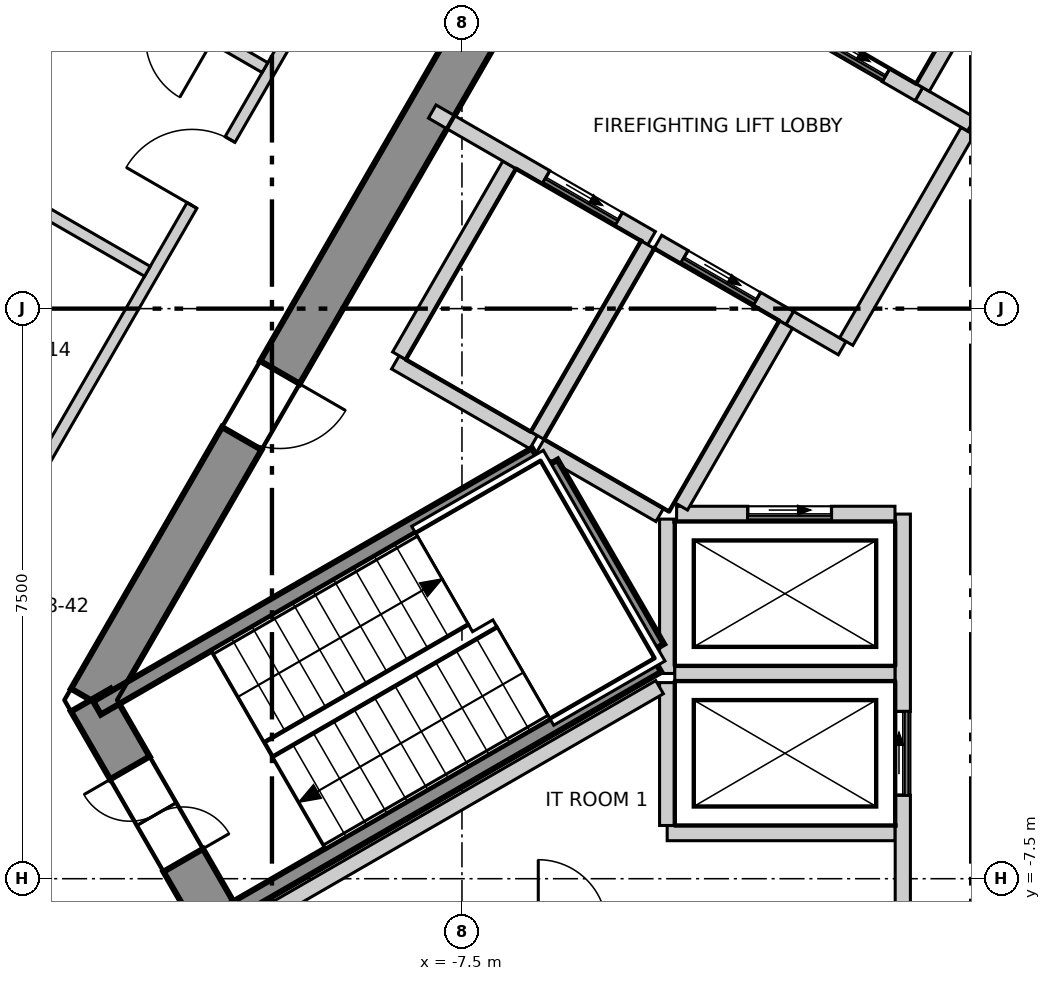
"""IFC4 building model, lengths in metres.
Left out: names, types, materials, properties, quantities, classifications, styles, units other than length and angle.
Written with IfcOpenShell. Run it as: python <this file> out.ifc"""

import sys

from ifc_helpers import new_model, si_unit, direction, frame, frame_2d, origin, place, context, subcontext, project, spatial, polyline, rectangle, outline, extrude, element, fill, save


model = new_model("IFC4")
c1 = context("Model", 3, precision=1e-05, world=origin(), true_north=direction((0.0, 1.0)))
c2 = subcontext(c1, "Body", "Model", "MODEL_VIEW")
j1 = project(units=[si_unit("LENGTHUNIT", "METRE"), si_unit("PLANEANGLEUNIT", "RADIAN")], contexts=[c1])
p1 = place(None, origin())
s1 = spatial("IfcSite", under=j1, at=p1, CompositionType="ELEMENT")
p2 = place(p1, origin())
s2 = spatial("IfcBuilding", under=s1, at=p2, CompositionType="ELEMENT")
p3 = place(p2, frame((0.0, 0.0, 289.9)))
s3 = spatial("IfcBuildingStorey", under=s2, at=p3, CompositionType="ELEMENT", Elevation=289.9)
p4 = place(p3, frame((-1.732, 13.3, -0.3), z_axis=(0.0, 0.0, 1.0), x_axis=(-0.500000539815, -0.866025092122, 0.0)))
e1 = element("IfcWall", 1, at=p4, inside=s3, PredefinedType="SHEAR", context=c2, shape_type="SweptSolid", body=[
    extrude(outline(polyline([(-0.173, -0.3), (1.795, -0.3), (3.763, -0.3), (5.732, -0.3), (7.7, -0.3), (9.668, -0.301), (11.637, -0.301), (13.605, -0.301), (15.573, -0.301), (17.542, -0.301), (19.51, -0.301), (21.478, -0.301), (21.131, 0.3), (19.226, 0.3), (17.321, 0.3), (15.415, 0.3), (13.51, 0.3), (11.605, 0.3), (9.699, 0.3), (7.794, 0.3), (5.889, 0.3), (3.984, 0.3), (2.078, 0.3), (0.173, 0.3), (-0.173, -0.3)])), origin(), (0.0, 0.0, 1.0), 3.6),
])
p5 = place(p4, frame((10.102, 0.0, 0.3)))
e2 = element("IfcOpeningElement", 2, at=p5, cuts=e1, PredefinedType="OPENING", context=c2, shape_type="SweptSolid", body=[
    extrude(rectangle(XDim=1.1, YDim=2.1, at=frame_2d((0.55, 1.05))), frame((0.0, 0.31, 0.0), z_axis=(0.0, -1.0, 0.0), x_axis=(1.0, 0.0, 0.0)), (0.0, 0.0, 1.0), 0.621),
])
p6 = place(p4, frame((16.328, 0.0, 0.3)))
e3 = element("IfcOpeningElement", 3, at=p6, cuts=e1, PredefinedType="OPENING", context=c2, shape_type="SweptSolid", body=[
    extrude(rectangle(XDim=1.0, YDim=2.1, at=frame_2d((0.5, 1.05))), frame((0.0, 0.31, 0.0), z_axis=(0.0, -1.0, 0.0), x_axis=(1.0, 0.0, 0.0)), (0.0, 0.0, 1.0), 0.621),
])
p7 = place(p4, frame((4.777, 0.0, 0.3)))
e4 = element("IfcOpeningElement", 4, at=p7, cuts=e1, PredefinedType="OPENING", context=c2, shape_type="SweptSolid", body=[
    extrude(rectangle(XDim=0.9, YDim=2.1, at=frame_2d((0.45, 1.05))), frame((0.0, 0.31, 0.0), z_axis=(0.0, -1.0, 0.0), x_axis=(1.0, 0.0, 0.0)), (0.0, 0.0, 1.0), 0.621),
])
p8 = place(p3, frame((-12.384, -5.15, -0.3), z_axis=(0.0, 0.0, 1.0), x_axis=(0.49997462182, -0.866040055388, 0.0)))
e5 = element("IfcWall", 5, at=p8, inside=s3, PredefinedType="SHEAR", context=c2, shape_type="SweptSolid", body=[
    extrude(outline(polyline([(-0.173, -0.301), (1.732, -0.301), (3.637, -0.3), (3.291, 0.3), (1.732, 0.3), (0.173, 0.3), (-0.173, -0.301)])), origin(), (0.0, 0.0, 1.0), 3.6),
])
p9 = place(p8, frame((1.032, 0.0, 0.3)))
e6 = element("IfcOpeningElement", 6, at=p9, cuts=e5, PredefinedType="OPENING", context=c2, shape_type="SweptSolid", body=[
    extrude(rectangle(XDim=1.4, YDim=2.1, at=frame_2d((0.7, 1.05))), frame((0.0, 0.31, 0.0), z_axis=(0.0, -1.0, 0.0), x_axis=(1.0, 0.0, 0.0)), (0.0, 0.0, 1.0), 0.621),
])
p10 = place(p3, frame((-2.494, 27.86, 0.0), z_axis=(0.0, 0.0, 1.0), x_axis=(-0.500008134474, -0.866020707292, 0.0)))
e7 = element("IfcWall", 7, at=p10, inside=s3, PredefinedType="ELEMENTEDWALL", context=c2, shape_type="SweptSolid", body=[
    extrude(rectangle(XDim=45.741, YDim=0.2, at=frame_2d((22.871, 0.0))), origin(), (0.0, 0.0, 1.0), 3.3),
])
p11 = place(p10, frame((2.15, 0.0, 0.9)))
e8 = element("IfcOpeningElement", 8, at=p11, cuts=e7, PredefinedType="OPENING", context=c2, shape_type="SweptSolid", body=[
    extrude(rectangle(XDim=3.7, YDim=2.2, at=frame_2d((1.85, 1.1))), frame((0.0, 0.11, 0.0), z_axis=(0.0, -1.0, 0.0), x_axis=(1.0, 0.0, 0.0)), (0.0, 0.0, 1.0), 0.22),
])
p12 = place(p10, frame((7.544, 0.0, 0.9)))
e9 = element("IfcOpeningElement", 9, at=p12, cuts=e7, PredefinedType="OPENING", context=c2, shape_type="SweptSolid", body=[
    extrude(rectangle(XDim=3.7, YDim=2.2, at=frame_2d((1.85, 1.1))), frame((0.0, 0.11, 0.0), z_axis=(0.0, -1.0, 0.0), x_axis=(1.0, 0.0, 0.0)), (0.0, 0.0, 1.0), 0.22),
])
p13 = place(p10, frame((12.939, 0.0, 0.9)))
e10 = element("IfcOpeningElement", 10, at=p13, cuts=e7, PredefinedType="OPENING", context=c2, shape_type="SweptSolid", body=[
    extrude(rectangle(XDim=3.7, YDim=2.2, at=frame_2d((1.85, 1.1))), frame((0.0, 0.11, 0.0), z_axis=(0.0, -1.0, 0.0), x_axis=(1.0, 0.0, 0.0)), (0.0, 0.0, 1.0), 0.22),
])
p14 = place(p10, frame((18.333, 0.0, 0.9)))
e11 = element("IfcOpeningElement", 11, at=p14, cuts=e7, PredefinedType="OPENING", context=c2, shape_type="SweptSolid", body=[
    extrude(rectangle(XDim=3.7, YDim=2.2, at=frame_2d((1.85, 1.1))), frame((0.0, 0.11, 0.0), z_axis=(0.0, -1.0, 0.0), x_axis=(1.0, 0.0, 0.0)), (0.0, 0.0, 1.0), 0.22),
])
p15 = place(p10, frame((23.728, 0.0, 0.9)))
e12 = element("IfcOpeningElement", 12, at=p15, cuts=e7, PredefinedType="OPENING", context=c2, shape_type="SweptSolid", body=[
    extrude(rectangle(XDim=3.7, YDim=2.2, at=frame_2d((1.85, 1.1))), frame((0.0, 0.11, 0.0), z_axis=(0.0, -1.0, 0.0), x_axis=(1.0, 0.0, 0.0)), (0.0, 0.0, 1.0), 0.22),
])
p16 = place(p10, frame((29.122, 0.0, 0.9)))
e13 = element("IfcOpeningElement", 13, at=p16, cuts=e7, PredefinedType="OPENING", context=c2, shape_type="SweptSolid", body=[
    extrude(rectangle(XDim=3.7, YDim=2.2, at=frame_2d((1.85, 1.1))), frame((0.0, 0.11, 0.0), z_axis=(0.0, -1.0, 0.0), x_axis=(1.0, 0.0, 0.0)), (0.0, 0.0, 1.0), 0.22),
])
p17 = place(p10, frame((34.517, 0.0, 0.9)))
e14 = element("IfcOpeningElement", 14, at=p17, cuts=e7, PredefinedType="OPENING", context=c2, shape_type="SweptSolid", body=[
    extrude(rectangle(XDim=3.7, YDim=2.2, at=frame_2d((1.85, 1.1))), frame((0.0, 0.11, 0.0), z_axis=(0.0, -1.0, 0.0), x_axis=(1.0, 0.0, 0.0)), (0.0, 0.0, 1.0), 0.22),
])
p18 = place(p10, frame((39.911, 0.0, 0.9)))
e15 = element("IfcOpeningElement", 15, at=p18, cuts=e7, PredefinedType="OPENING", context=c2, shape_type="SweptSolid", body=[
    extrude(rectangle(XDim=3.7, YDim=2.2, at=frame_2d((1.85, 1.1))), frame((0.0, 0.11, 0.0), z_axis=(0.0, -1.0, 0.0), x_axis=(1.0, 0.0, 0.0)), (0.0, 0.0, 1.0), 0.22),
])
p19 = place(p3, frame((-17.679, -10.12, 0.0), z_axis=(0.0, 0.0, 1.0), x_axis=(0.500008955215, 0.866020233427, 0.0)))
e16 = element("IfcWall", 16, at=p19, inside=s3, PredefinedType="PARTITIONING", context=c2, shape_type="SweptSolid", body=[
    extrude(rectangle(XDim=35.357, YDim=0.15, at=frame_2d((17.679, 0.0))), origin(), (0.0, 0.0, 1.0), 3.3),
])
p20 = place(p19, frame((31.407, 0.0, 0.0)))
e17 = element("IfcOpeningElement", 17, at=p20, cuts=e16, PredefinedType="OPENING", context=c2, shape_type="SweptSolid", body=[
    extrude(rectangle(XDim=1.0, YDim=2.1, at=frame_2d((0.5, 1.05))), frame((0.0, 0.085, 0.0), z_axis=(0.0, -1.0, 0.0), x_axis=(1.0, 0.0, 0.0)), (0.0, 0.0, 1.0), 0.17),
])
p21 = place(p19, frame((25.642, 0.0, 0.0)))
e18 = element("IfcOpeningElement", 18, at=p21, cuts=e16, PredefinedType="OPENING", context=c2, shape_type="SweptSolid", body=[
    extrude(rectangle(XDim=1.0, YDim=2.1, at=frame_2d((0.5, 1.05))), frame((0.0, 0.085, 0.0), z_axis=(0.0, -1.0, 0.0), x_axis=(1.0, 0.0, 0.0)), (0.0, 0.0, 1.0), 0.17),
])
p22 = place(p19, frame((18.348, 0.0, 0.0)))
e19 = element("IfcOpeningElement", 19, at=p22, cuts=e16, PredefinedType="OPENING", context=c2, shape_type="SweptSolid", body=[
    extrude(rectangle(XDim=1.0, YDim=2.1, at=frame_2d((0.5, 1.05))), frame((0.0, 0.085, 0.0), z_axis=(0.0, -1.0, 0.0), x_axis=(1.0, 0.0, 0.0)), (0.0, 0.0, 1.0), 0.17),
])
p23 = place(p19, frame((13.254, 0.0, 0.0)))
e20 = element("IfcOpeningElement", 20, at=p23, cuts=e16, PredefinedType="OPENING", context=c2, shape_type="SweptSolid", body=[
    extrude(rectangle(XDim=1.0, YDim=2.1, at=frame_2d((0.5, 1.05))), frame((0.0, 0.085, 0.0), z_axis=(0.0, -1.0, 0.0), x_axis=(1.0, 0.0, 0.0)), (0.0, 0.0, 1.0), 0.17),
])
p24 = place(p19, frame((7.559, 0.0, 0.0)))
e21 = element("IfcOpeningElement", 21, at=p24, cuts=e16, PredefinedType="OPENING", context=c2, shape_type="SweptSolid", body=[
    extrude(rectangle(XDim=1.0, YDim=2.1, at=frame_2d((0.5, 1.05))), frame((0.0, 0.085, 0.0), z_axis=(0.0, -1.0, 0.0), x_axis=(1.0, 0.0, 0.0)), (0.0, 0.0, 1.0), 0.17),
])
p25 = place(p19, frame((2.865, 0.0, 0.0)))
e22 = element("IfcOpeningElement", 22, at=p25, cuts=e16, PredefinedType="OPENING", context=c2, shape_type="SweptSolid", body=[
    extrude(rectangle(XDim=1.0, YDim=2.1, at=frame_2d((0.5, 1.05))), frame((0.0, 0.085, 0.0), z_axis=(0.0, -1.0, 0.0), x_axis=(1.0, 0.0, 0.0)), (0.0, 0.0, 1.0), 0.17),
])
p26 = place(p3, frame((-16.562, 3.333, 0.0), z_axis=(0.0, 0.0, 1.0), x_axis=(0.866048987239, -0.499959150034, 0.0)))
e23 = element("IfcWall", 23, at=p26, inside=s3, PredefinedType="PARTITIONING", context=c2, shape_type="SweptSolid", body=[
    extrude(rectangle(XDim=5.685, YDim=0.15, at=frame_2d((2.842, 0.0))), origin(), (0.0, 0.0, 1.0), 3.3),
])
p27 = place(p3, frame((-12.3, 4.446, 0.0), z_axis=(0.0, 0.0, 1.0), x_axis=(0.865965520905, -0.500103705848, 0.0)))
e24 = element("IfcWall", 24, at=p27, inside=s3, PredefinedType="PARTITIONING", context=c2, shape_type="SweptSolid", body=[
    extrude(rectangle(XDim=2.55, YDim=0.15, at=frame_2d((1.275, 0.0))), origin(), (0.0, 0.0, 1.0), 3.3),
])
p28 = place(p27, frame((0.875, 0.0, 0.0)))
e25 = element("IfcOpeningElement", 25, at=p28, cuts=e24, PredefinedType="OPENING", context=c2, shape_type="SweptSolid", body=[
    extrude(rectangle(XDim=0.9, YDim=2.1, at=frame_2d((0.45, 1.05))), frame((0.0, 0.085, 0.0), z_axis=(0.0, -1.0, 0.0), x_axis=(1.0, 0.0, 0.0)), (0.0, 0.0, 1.0), 0.17),
])
p29 = place(p3, frame((-8.376, -0.707, 0.0), z_axis=(0.0, 0.0, 1.0), x_axis=(0.866067520717, -0.499927044236, 0.0)))
e26 = element("IfcWall", 26, at=p29, inside=s3, PredefinedType="SOLIDWALL", context=c2, shape_type="SweptSolid", body=[
    extrude(rectangle(XDim=2.1, YDim=0.2, at=frame_2d((1.05, 0.0))), origin(), (0.0, 0.0, 1.0), 3.3),
])
p30 = place(p3, frame((-8.326, -0.62, 0.0), z_axis=(0.0, 0.0, 1.0), x_axis=(0.500023687443, 0.866011727401, 0.0)))
e27 = element("IfcWall", 27, at=p30, inside=s3, PredefinedType="SOLIDWALL", context=c2, shape_type="SweptSolid", body=[
    extrude(rectangle(XDim=2.9, YDim=0.2, at=frame_2d((1.45, 0.0))), origin(), (0.0, 0.0, 1.0), 3.3),
])
p31 = place(p3, frame((-4.8, -6.9, 0.0), z_axis=(0.0, 0.0, 1.0), x_axis=(1.0, 0.0, 0.0)))
e28 = element("IfcWall", 28, at=p31, inside=s3, PredefinedType="SOLIDWALL", context=c2, shape_type="SweptSolid", body=[
    extrude(rectangle(XDim=3.0, YDim=0.2, at=frame_2d((1.5, 0.0))), origin(), (0.0, 0.0, 1.0), 3.3),
])
p32 = place(p3, frame((-4.8, -6.8, 0.0), z_axis=(0.0, 0.0, 1.0), x_axis=(0.0, 1.0, 0.0)))
e29 = element("IfcWall", 29, at=p32, inside=s3, PredefinedType="SOLIDWALL", context=c2, shape_type="SweptSolid", body=[
    extrude(rectangle(XDim=1.88, YDim=0.2, at=frame_2d((0.94, 0.0))), origin(), (0.0, 0.0, 1.0), 3.3),
])
p33 = place(p3, frame((-4.8, -4.8, 0.0), z_axis=(0.0, 0.0, 1.0), x_axis=(0.0, 1.0, 0.0)))
e30 = element("IfcWall", 30, at=p33, inside=s3, PredefinedType="SOLIDWALL", context=c2, shape_type="SweptSolid", body=[
    extrude(rectangle(XDim=2.031, YDim=0.2, at=frame_2d((1.016, 0.0))), origin(), (0.0, 0.0, 1.0), 3.3),
])
p34 = place(p3, frame((-4.7, -4.8, 0.0), z_axis=(0.0, 0.0, 1.0), x_axis=(1.0, 0.0, 0.0)))
e31 = element("IfcWall", 31, at=p34, inside=s3, PredefinedType="SOLIDWALL", context=c2, shape_type="SweptSolid", body=[
    extrude(rectangle(XDim=2.9, YDim=0.2, at=frame_2d((1.45, 0.0))), origin(), (0.0, 0.0, 1.0), 3.3),
])
p35 = place(p3, frame((-1.7, -8.13, 0.0), z_axis=(0.0, 0.0, 1.0), x_axis=(0.0, 1.0, 0.0)))
e32 = element("IfcWall", 32, at=p35, inside=s3, PredefinedType="SOLIDWALL", context=c2, shape_type="SweptSolid", body=[
    extrude(rectangle(XDim=5.427, YDim=0.2, at=frame_2d((2.713, 0.0))), origin(), (0.0, 0.0, 1.0), 3.3),
])
p36 = place(p35, frame((1.73, 0.0, 0.0)))
e33 = element("IfcOpeningElement", 33, at=p36, cuts=e32, PredefinedType="OPENING", context=c2, shape_type="SweptSolid", body=[
    extrude(rectangle(XDim=1.1, YDim=2.1, at=frame_2d((0.55, 1.05))), frame((0.0, 0.11, 0.0), z_axis=(0.0, -1.0, 0.0), x_axis=(1.0, 0.0, 0.0)), (0.0, 0.0, 1.0), 0.22),
])
p37 = place(p3, frame((-4.676, -2.7, 0.0), z_axis=(0.0, 0.0, 1.0), x_axis=(1.0, 0.0, 0.0)))
e34 = element("IfcWall", 34, at=p37, inside=s3, PredefinedType="SOLIDWALL", context=c2, shape_type="SweptSolid", body=[
    extrude(rectangle(XDim=2.873, YDim=0.2, at=frame_2d((1.437, 0.0))), origin(), (0.0, 0.0, 1.0), 3.3),
])
p38 = place(p37, frame((0.937, 0.0, 0.0)))
e35 = element("IfcOpeningElement", 35, at=p38, cuts=e34, PredefinedType="OPENING", context=c2, shape_type="SweptSolid", body=[
    extrude(rectangle(XDim=1.1, YDim=2.1, at=frame_2d((0.55, 1.05))), frame((0.0, 0.11, 0.0), z_axis=(0.0, -1.0, 0.0), x_axis=(1.0, 0.0, 0.0)), (0.0, 0.0, 1.0), 0.22),
])
p39 = place(p3, frame((-7.891, 2.593, 0.0), z_axis=(0.0, 0.0, 1.0), x_axis=(0.866070917804, -0.499921159118, 0.0)))
e36 = element("IfcWall", 36, at=p39, inside=s3, PredefinedType="SOLIDWALL", context=c2, shape_type="SweptSolid", body=[
    extrude(rectangle(XDim=3.333, YDim=0.2, at=frame_2d((1.666, 0.0))), origin(), (0.0, 0.0, 1.0), 3.3),
])
p40 = place(p39, frame((1.73, 0.0, 0.0)))
e37 = element("IfcOpeningElement", 37, at=p40, cuts=e36, PredefinedType="OPENING", context=c2, shape_type="SweptSolid", body=[
    extrude(rectangle(XDim=1.1, YDim=2.1, at=frame_2d((0.55, 1.05))), frame((0.0, 0.11, 0.0), z_axis=(0.0, -1.0, 0.0), x_axis=(1.0, 0.0, 0.0)), (0.0, 0.0, 1.0), 0.22),
])
p41 = place(p3, frame((-3.188, -0.122, 0.0), z_axis=(0.0, 0.0, 1.0), x_axis=(0.865705793592, -0.50055317294, 0.0)))
e38 = element("IfcWall", 38, at=p41, inside=s3, PredefinedType="SOLIDWALL", context=c2, shape_type="SweptSolid", body=[
    extrude(rectangle(XDim=0.797, YDim=0.2, at=frame_2d((0.398, 0.0))), origin(), (0.0, 0.0, 1.0), 3.3),
])
p42 = place(p3, frame((-1.488, 2.822, 0.0), z_axis=(0.0, 0.0, 1.0), x_axis=(0.866236612152, -0.499633997809, 0.0)))
e39 = element("IfcWall", 39, at=p42, inside=s3, PredefinedType="SOLIDWALL", context=c2, shape_type="SweptSolid", body=[
    extrude(rectangle(XDim=0.796, YDim=0.2, at=frame_2d((0.398, 0.0))), origin(), (0.0, 0.0, 1.0), 3.3),
])
p43 = place(p3, frame((-2.444, -0.433, 0.0), z_axis=(0.0, 0.0, 1.0), x_axis=(0.500035624827, 0.866004834804, 0.0)))
e40 = element("IfcWall", 40, at=p43, inside=s3, PredefinedType="SOLIDWALL", context=c2, shape_type="SweptSolid", body=[
    extrude(rectangle(XDim=3.194, YDim=0.2, at=frame_2d((1.597, 0.0))), origin(), (0.0, 0.0, 1.0), 3.3),
])
p44 = place(p3, frame((-6.507, -1.67, 0.0), z_axis=(0.0, 0.0, 1.0), x_axis=(0.50012328804, 0.865954211699, 0.0)))
e41 = element("IfcWall", 41, at=p44, inside=s3, PredefinedType="SOLIDWALL", context=c2, shape_type="SweptSolid", body=[
    extrude(rectangle(XDim=2.9, YDim=0.2, at=frame_2d((1.45, 0.0))), origin(), (0.0, 0.0, 1.0), 3.3),
])
p45 = place(p3, frame((-6.47, -1.807, 0.0), z_axis=(0.0, 0.0, 1.0), x_axis=(0.865883195159, -0.500246231712, 0.0)))
e42 = element("IfcWall", 42, at=p45, inside=s3, PredefinedType="SOLIDWALL", context=c2, shape_type="SweptSolid", body=[
    extrude(rectangle(XDim=1.815, YDim=0.2, at=frame_2d((0.908, 0.0))), origin(), (0.0, 0.0, 1.0), 3.3),
])
p46 = place(p3, frame((-4.922, 0.879, 0.0), z_axis=(0.0, 0.0, 1.0), x_axis=(0.866073918653, -0.499915960366, 0.0)))
e43 = element("IfcWall", 43, at=p46, inside=s3, PredefinedType="SOLIDWALL", context=c2, shape_type="SweptSolid", body=[
    extrude(rectangle(XDim=2.002, YDim=0.2, at=frame_2d((1.001, 0.0))), origin(), (0.0, 0.0, 1.0), 3.3),
])
p47 = place(p46, frame((0.402, 0.0, 0.0)))
e44 = element("IfcOpeningElement", 44, at=p47, cuts=e43, PredefinedType="OPENING", context=c2, shape_type="SweptSolid", body=[
    extrude(rectangle(XDim=1.1, YDim=2.1, at=frame_2d((0.55, 1.05))), frame((0.0, 0.11, 0.0), z_axis=(0.0, -1.0, 0.0), x_axis=(1.0, 0.0, 0.0)), (0.0, 0.0, 1.0), 0.22),
])
p48 = place(p3, frame((-4.619, -2.6, 0.0), z_axis=(0.0, 0.0, 1.0), x_axis=(0.50009492287, 0.865970593103, 0.0)))
e45 = element("IfcWall", 45, at=p48, inside=s3, PredefinedType="SOLIDWALL", context=c2, shape_type="SweptSolid", body=[
    extrude(rectangle(XDim=2.761, YDim=0.2, at=frame_2d((1.381, 0.0))), origin(), (0.0, 0.0, 1.0), 3.3),
])
p49 = place(p3, frame((-3.309, 3.873, 0.0), z_axis=(0.0, 0.0, 1.0), x_axis=(0.866098583652, -0.499873227325, 0.0)))
e46 = element("IfcWall", 46, at=p49, inside=s3, PredefinedType="SOLIDWALL", context=c2, shape_type="SweptSolid", body=[
    extrude(rectangle(XDim=2.103, YDim=0.2, at=frame_2d((1.051, 0.0))), origin(), (0.0, 0.0, 1.0), 3.3),
])
p50 = place(p49, frame((0.502, 0.0, 0.0)))
e47 = element("IfcOpeningElement", 47, at=p50, cuts=e46, PredefinedType="OPENING", context=c2, shape_type="SweptSolid", body=[
    extrude(rectangle(XDim=1.1, YDim=2.1, at=frame_2d((0.55, 1.05))), frame((0.0, 0.11, 0.0), z_axis=(0.0, -1.0, 0.0), x_axis=(1.0, 0.0, 0.0)), (0.0, 0.0, 1.0), 0.22),
])
p51 = place(p3, frame((-1.438, 2.909, 0.0), z_axis=(0.0, 0.0, 1.0), x_axis=(0.499829630636, 0.866123744241, 0.0)))
e48 = element("IfcWall", 48, at=p51, inside=s3, PredefinedType="SOLIDWALL", context=c2, shape_type="SweptSolid", body=[
    extrude(rectangle(XDim=2.761, YDim=0.2, at=frame_2d((1.38, 0.0))), origin(), (0.0, 0.0, 1.0), 3.3),
])
p52 = place(p3, frame((-10.357, -8.13, 0.0), z_axis=(0.0, 0.0, 1.0), x_axis=(0.866074613031, 0.499914757397, 0.0)))
e49 = element("IfcWall", 49, at=p52, inside=s3, PredefinedType="SOLIDWALL", context=c2, shape_type="SweptSolid", body=[
    extrude(rectangle(XDim=6.301, YDim=0.2, at=frame_2d((3.15, 0.0))), origin(), (0.0, 0.0, 1.0), 3.3),
])
p53 = place(p3, frame((-12.301, -5.254, 0.0), z_axis=(0.0, 0.0, 1.0), x_axis=(0.866068467981, 0.499925403204, 0.0)))
e50 = element("IfcWall", 50, at=p53, inside=s3, PredefinedType="SOLIDWALL", context=c2, shape_type="SweptSolid", body=[
    extrude(rectangle(XDim=6.665, YDim=0.2, at=frame_2d((3.332, 0.0))), origin(), (0.0, 0.0, 1.0), 3.3),
])
p54 = place(p3, frame((-6.329, -2.038, 0.0), z_axis=(0.0, 0.0, 1.0), x_axis=(0.500200581029, -0.865909567298, 0.0)))
e51 = element("IfcWall", 51, at=p54, inside=s3, PredefinedType="SOLIDWALL", context=c2, shape_type="SweptSolid", body=[
    extrude(rectangle(XDim=2.799, YDim=0.2, at=frame_2d((1.399, 0.0))), origin(), (0.0, 0.0, 1.0), 3.3),
])
p55 = place(p3, frame((-10.701, -8.026, 0.0), z_axis=(0.0, 0.0, 1.0), x_axis=(0.866005022404, 0.500035299925, 0.0)))
e52 = element("IfcWall", 52, at=p55, inside=s3, PredefinedType="SOLIDWALL", context=c2, shape_type="SweptSolid", body=[
    extrude(rectangle(XDim=6.665, YDim=0.2, at=frame_2d((3.333, 0.0))), origin(), (0.0, 0.0, 1.0), 3.3),
])
p56 = place(p38, origin())
e53 = element("IfcDoor", 53, at=p56, inside=s3, OperationType="SLIDING_TO_LEFT", PredefinedType="DOOR", context=c2, shape_type="SweptSolid", body=[
    extrude(rectangle(XDim=1.1, YDim=2.1, at=frame_2d((0.55, 1.05))), frame((0.0, 0.025, 0.0), z_axis=(0.0, -1.0, 0.0), x_axis=(1.0, 0.0, 0.0)), (0.0, 0.0, 1.0), 0.05),
])
fill(e35, e53)
p57 = place(p36, origin())
e54 = element("IfcDoor", 54, at=p57, inside=s3, OperationType="SLIDING_TO_LEFT", PredefinedType="DOOR", context=c2, shape_type="SweptSolid", body=[
    extrude(rectangle(XDim=1.1, YDim=2.1, at=frame_2d((0.55, 1.05))), frame((0.0, 0.025, 0.0), z_axis=(0.0, -1.0, 0.0), x_axis=(1.0, 0.0, 0.0)), (0.0, 0.0, 1.0), 0.05),
])
fill(e33, e54)
p58 = place(p47, origin())
e55 = element("IfcDoor", 55, at=p58, inside=s3, OperationType="SLIDING_TO_LEFT", PredefinedType="DOOR", context=c2, shape_type="SweptSolid", body=[
    extrude(rectangle(XDim=1.1, YDim=2.1, at=frame_2d((0.55, 1.05))), frame((0.0, 0.025, 0.0), z_axis=(0.0, -1.0, 0.0), x_axis=(1.0, 0.0, 0.0)), (0.0, 0.0, 1.0), 0.05),
])
fill(e44, e55)
p59 = place(p50, origin())
e56 = element("IfcDoor", 56, at=p59, inside=s3, OperationType="SLIDING_TO_LEFT", PredefinedType="DOOR", context=c2, shape_type="SweptSolid", body=[
    extrude(rectangle(XDim=1.1, YDim=2.1, at=frame_2d((0.55, 1.05))), frame((0.0, 0.025, 0.0), z_axis=(0.0, -1.0, 0.0), x_axis=(1.0, 0.0, 0.0)), (0.0, 0.0, 1.0), 0.05),
])
fill(e47, e56)
p60 = place(p40, origin())
e57 = element("IfcDoor", 57, at=p60, inside=s3, OperationType="SLIDING_TO_LEFT", PredefinedType="DOOR", context=c2, shape_type="SweptSolid", body=[
    extrude(rectangle(XDim=1.1, YDim=2.1, at=frame_2d((0.55, 1.05))), frame((0.0, 0.025, 0.0), z_axis=(0.0, -1.0, 0.0), x_axis=(1.0, 0.0, 0.0)), (0.0, 0.0, 1.0), 0.05),
])
fill(e37, e57)
p61 = place(p23, origin())
e58 = element("IfcDoor", 58, at=p61, inside=s3, OperationType="SINGLE_SWING_RIGHT", PredefinedType="DOOR", context=c2, shape_type="SweptSolid", body=[
    extrude(rectangle(XDim=1.0, YDim=2.1, at=frame_2d((0.5, 1.05))), frame((0.0, 0.025, 0.0), z_axis=(0.0, -1.0, 0.0), x_axis=(1.0, 0.0, 0.0)), (0.0, 0.0, 1.0), 0.05),
])
fill(e20, e58)
p62 = place(p9, origin())
e59 = element("IfcDoor", 59, at=p62, inside=s3, OperationType="DOUBLE_DOOR_SINGLE_SWING", PredefinedType="DOOR", context=c2, shape_type="SweptSolid", body=[
    extrude(rectangle(XDim=1.4, YDim=2.1, at=frame_2d((0.7, 1.05))), frame((0.0, 0.025, 0.0), z_axis=(0.0, -1.0, 0.0), x_axis=(1.0, 0.0, 0.0)), (0.0, 0.0, 1.0), 0.05),
])
fill(e6, e59)
p63 = place(p6, origin())
e60 = element("IfcDoor", 60, at=p63, inside=s3, OperationType="SINGLE_SWING_RIGHT", PredefinedType="DOOR", context=c2, shape_type="SweptSolid", body=[
    extrude(rectangle(XDim=1.0, YDim=2.1, at=frame_2d((0.5, 1.05))), frame((0.0, 0.025, 0.0), z_axis=(0.0, -1.0, 0.0), x_axis=(1.0, 0.0, 0.0)), (0.0, 0.0, 1.0), 0.05),
])
fill(e3, e60)
save(model, sys.argv[1])
